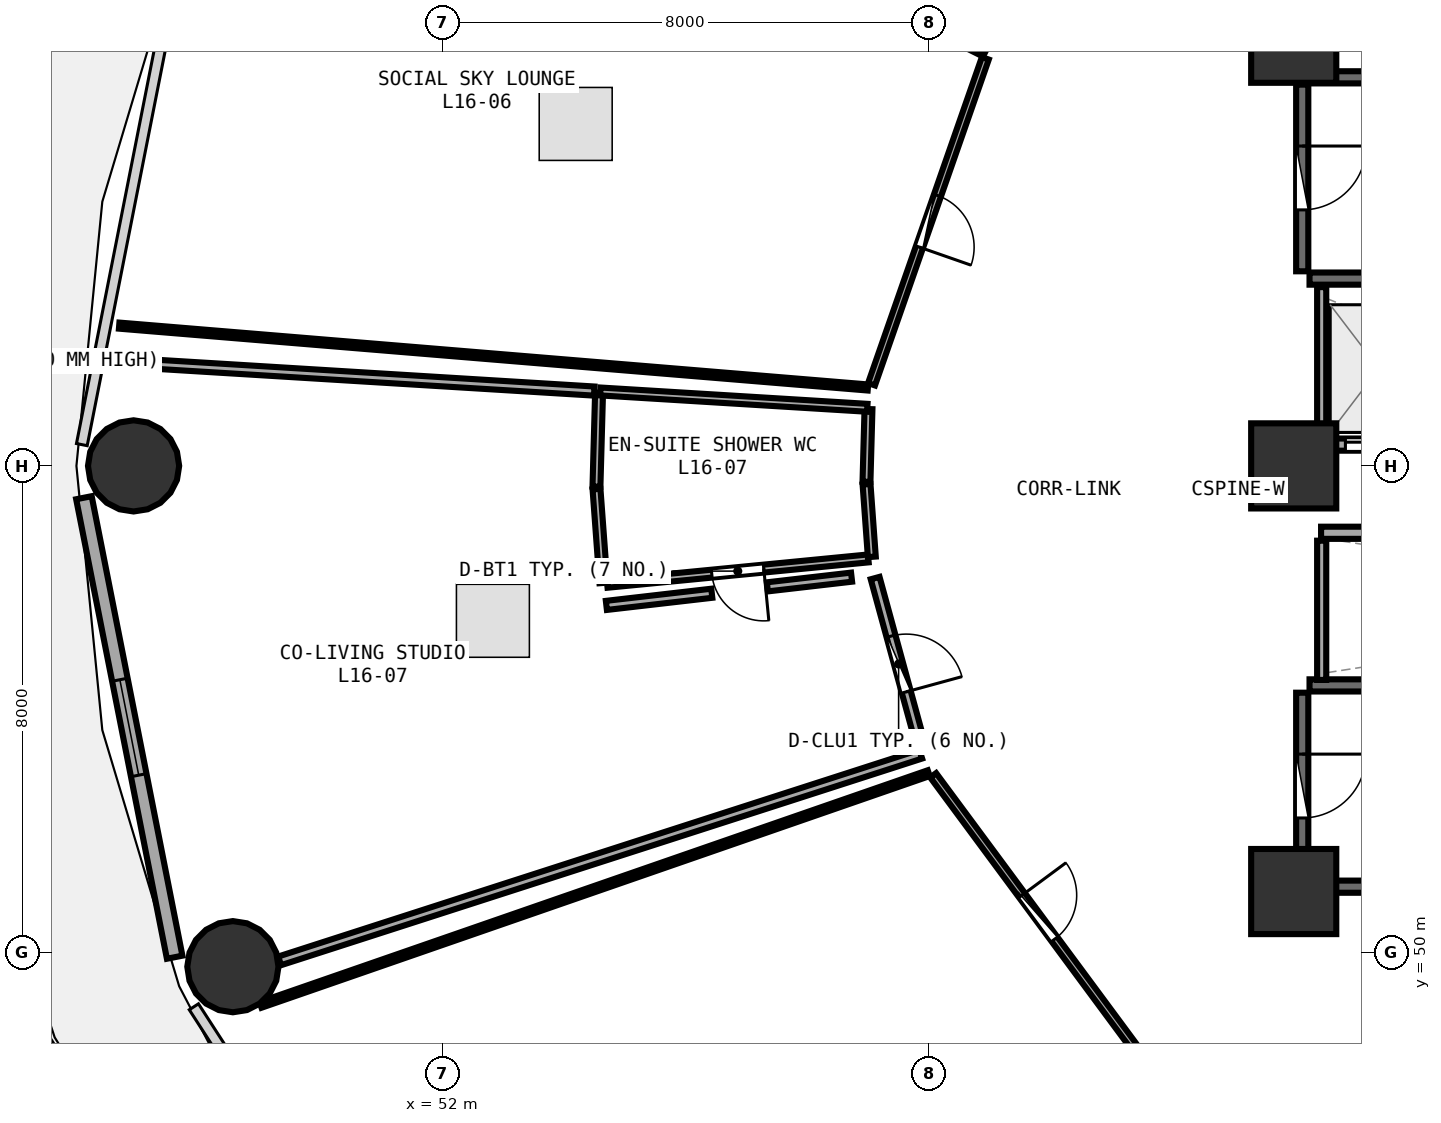
"""IFC4 building model, lengths in metres.
Left out: names, types, materials, properties, quantities, classifications, styles, units other than length and angle.
Written with IfcOpenShell. Run it as: python <this file> out.ifc"""

import sys

from ifc_helpers import new_model, si_unit, direction, frame, frame_2d, origin, origin_2d, place, context, subcontext, project, spatial, rectangle, circle, extrude, element, fill, save


model = new_model("IFC4")
c1 = context("Model", 3, precision=1e-05, world=origin(), true_north=direction((0.0, 1.0)))
c2 = subcontext(c1, "Body", "Model", "MODEL_VIEW")
j1 = project(units=[si_unit("LENGTHUNIT", "METRE"), si_unit("PLANEANGLEUNIT", "RADIAN")], contexts=[c1])
p1 = place(None, origin())
s1 = spatial("IfcSite", under=j1, at=p1, CompositionType="ELEMENT")
p2 = place(p1, origin())
s2 = spatial("IfcBuilding", under=s1, at=p2, CompositionType="ELEMENT")
p3 = place(p2, frame((0.0, 0.0, 63.75)))
s3 = spatial("IfcBuildingStorey", under=s2, at=p3, CompositionType="ELEMENT", Elevation=63.75)
for number, where, z_axis, x_axis in (
    (1, (66.0, 51.0, 0.0), (0.0, 0.0, 1.0), (1.0, 0.0, 0.0)),
    (2, (66.0, 65.0, 0.0), (0.0, 0.0, 1.0), (1.0, 0.0, 0.0)),
    (3, (66.0, 58.0, 0.0), (0.0, 0.0, 1.0), (1.0, 0.0, 0.0)),
):
    element("IfcColumn", number, at=place(p3, frame(where, z_axis=z_axis, x_axis=x_axis)), inside=s3, PredefinedType="PILASTER", context=c2, shape_type="SweptSolid", body=[
        extrude(rectangle(XDim=1.4, YDim=1.4, at=origin_2d()), origin(), (0.0, 0.0, 1.0), 3.75),
    ])
for number, where, z_axis, x_axis in (
    (4, (46.92, 58.0, 0.0), (0.0, 0.0, 1.0), (1.0, 0.0, 0.0)),
    (5, (48.553, 49.764, 0.0), (0.0, 0.0, 1.0), (1.0, 0.0, 0.0)),
):
    element("IfcColumn", number, at=place(p3, frame(where, z_axis=z_axis, x_axis=x_axis)), inside=s3, PredefinedType="COLUMN", context=c2, shape_type="SweptSolid", body=[
        extrude(circle(Radius=0.75, at=origin_2d()), origin(), (0.0, 0.0, 1.0), 3.75),
    ])
p4 = place(p3, frame((46.104, 57.477, 0.0), z_axis=(0.0, 0.0, 1.0), x_axis=(0.193726159581, -0.98105564322, 0.0)))
e6 = element("IfcWall", 6, at=p4, inside=s3, PredefinedType="SOLIDWALL", context=c2, shape_type="SweptSolid", body=[
    extrude(rectangle(XDim=7.703, YDim=0.26, at=frame_2d((3.851, 0.0))), origin(), (0.0, 0.0, 1.0), 3.475),
])
p5 = place(p4, frame((3.051, 0.0, 0.85)))
e7 = element("IfcOpeningElement", 7, at=p5, cuts=e6, PredefinedType="OPENING", context=c2, shape_type="SweptSolid", body=[
    extrude(rectangle(XDim=1.6, YDim=1.45, at=frame_2d((0.8, 0.725))), frame((0.0, 0.14, 0.0), z_axis=(0.0, -1.0, 0.0), x_axis=(1.0, 0.0, 0.0)), (0.0, 0.0, 1.0), 0.28),
])
for number, where, z_axis, x_axis in (
    (8, (66.26, 61.08, 0.0), (0.0, 0.0, 1.0), (1.0, 0.0, 0.0)),
    (9, (73.42, 64.39, 0.0), (0.0, 0.0, 1.0), (-1.0, 0.0, 0.0)),
):
    element("IfcWall", number, at=place(p3, frame(where, z_axis=z_axis, x_axis=x_axis)), inside=s3, PredefinedType="SHEAR", context=c2, shape_type="SweptSolid", body=[
        extrude(rectangle(XDim=7.16, YDim=0.2, at=frame_2d((3.58, 0.0))), origin(), (0.0, 0.0, 1.0), 3.49),
    ])
p6 = place(p3, frame((66.14, 64.27, 0.0), z_axis=(0.0, 0.0, 1.0), x_axis=(0.0, -1.0, 0.0)))
e10 = element("IfcWall", 10, at=p6, inside=s3, PredefinedType="SHEAR", context=c2, shape_type="SweptSolid", body=[
    extrude(rectangle(XDim=3.07, YDim=0.2, at=frame_2d((1.535, 0.0))), origin(), (0.0, 0.0, 1.0), 3.49),
])
p7 = place(p6, frame((1.01, 0.0, 0.0)))
e11 = element("IfcOpeningElement", 11, at=p7, cuts=e10, PredefinedType="OPENING", context=c2, shape_type="SweptSolid", body=[
    extrude(rectangle(XDim=1.05, YDim=2.1, at=frame_2d((0.525, 1.05))), frame((0.0, 0.11, 0.0), z_axis=(0.0, -1.0, 0.0), x_axis=(1.0, 0.0, 0.0)), (0.0, 0.0, 1.0), 0.22),
])
for number, where, z_axis, x_axis in (
    (12, (66.26, 51.08, 0.0), (0.0, 0.0, 1.0), (1.0, 0.0, 0.0)),
    (13, (73.42, 54.39, 0.0), (0.0, 0.0, 1.0), (-1.0, 0.0, 0.0)),
):
    element("IfcWall", number, at=place(p3, frame(where, z_axis=z_axis, x_axis=x_axis)), inside=s3, PredefinedType="SHEAR", context=c2, shape_type="SweptSolid", body=[
        extrude(rectangle(XDim=7.16, YDim=0.2, at=frame_2d((3.58, 0.0))), origin(), (0.0, 0.0, 1.0), 3.49),
    ])
p8 = place(p3, frame((66.14, 54.27, 0.0), z_axis=(0.0, 0.0, 1.0), x_axis=(0.0, -1.0, 0.0)))
e14 = element("IfcWall", 14, at=p8, inside=s3, PredefinedType="SHEAR", context=c2, shape_type="SweptSolid", body=[
    extrude(rectangle(XDim=3.07, YDim=0.2, at=frame_2d((1.535, 0.0))), origin(), (0.0, 0.0, 1.0), 3.49),
])
p9 = place(p8, frame((1.01, 0.0, 0.0)))
e15 = element("IfcOpeningElement", 15, at=p9, cuts=e14, PredefinedType="OPENING", context=c2, shape_type="SweptSolid", body=[
    extrude(rectangle(XDim=1.05, YDim=2.1, at=frame_2d((0.525, 1.05))), frame((0.0, 0.11, 0.0), z_axis=(0.0, -1.0, 0.0), x_axis=(1.0, 0.0, 0.0)), (0.0, 0.0, 1.0), 0.22),
])
p10 = place(p3, frame((66.45, 58.35, 0.0), z_axis=(0.0, 0.0, 1.0), x_axis=(1.0, 0.0, 0.0)))
e16 = element("IfcWall", 16, at=p10, inside=s3, PredefinedType="SOLIDWALL", context=c2, shape_type="SweptSolid", body=[
    extrude(rectangle(XDim=6.0, YDim=0.2, at=frame_2d((3.0, 0.0))), origin(), (0.0, 0.0, 1.0), 3.48),
])
p11 = place(p10, frame((0.4, 0.0, 0.0)))
e17 = element("IfcOpeningElement", 17, at=p11, cuts=e16, PredefinedType="OPENING", context=c2, shape_type="SweptSolid", body=[
    extrude(rectangle(XDim=1.1, YDim=2.1, at=frame_2d((0.55, 1.05))), frame((0.0, 0.11, 0.0), z_axis=(0.0, -1.0, 0.0), x_axis=(1.0, 0.0, 0.0)), (0.0, 0.0, 1.0), 0.22),
])
p12 = place(p10, frame((2.4, 0.0, 0.0)))
e18 = element("IfcOpeningElement", 18, at=p12, cuts=e16, PredefinedType="OPENING", context=c2, shape_type="SweptSolid", body=[
    extrude(rectangle(XDim=1.1, YDim=2.1, at=frame_2d((0.55, 1.05))), frame((0.0, 0.11, 0.0), z_axis=(0.0, -1.0, 0.0), x_axis=(1.0, 0.0, 0.0)), (0.0, 0.0, 1.0), 0.22),
])
p13 = place(p10, frame((4.4, 0.0, 0.0)))
e19 = element("IfcOpeningElement", 19, at=p13, cuts=e16, PredefinedType="OPENING", context=c2, shape_type="SweptSolid", body=[
    extrude(rectangle(XDim=1.1, YDim=2.1, at=frame_2d((0.55, 1.05))), frame((0.0, 0.11, 0.0), z_axis=(0.0, -1.0, 0.0), x_axis=(1.0, 0.0, 0.0)), (0.0, 0.0, 1.0), 0.22),
])
p14 = place(p3, frame((66.46, 58.48, 0.0), z_axis=(0.0, 0.0, 1.0), x_axis=(0.0, 1.0, 0.0)))
e20 = element("IfcWall", 20, at=p14, inside=s3, PredefinedType="PARTITIONING", context=c2, shape_type="SweptSolid", body=[
    extrude(rectangle(XDim=2.46, YDim=0.15, at=frame_2d((1.23, 0.0))), origin(), (0.0, 0.0, 1.0), 3.48),
])
p15 = place(p3, frame((66.45, 56.9, 0.0), z_axis=(0.0, 0.0, 1.0), x_axis=(1.0, 0.0, 0.0)))
e21 = element("IfcWall", 21, at=p15, inside=s3, PredefinedType="SOLIDWALL", context=c2, shape_type="SweptSolid", body=[
    extrude(rectangle(XDim=14.4, YDim=0.2, at=frame_2d((7.2, 0.0))), origin(), (0.0, 0.0, 1.0), 3.48),
])
p16 = place(p3, frame((66.46, 54.48, 0.0), z_axis=(0.0, 0.0, 1.0), x_axis=(0.0, 1.0, 0.0)))
e22 = element("IfcWall", 22, at=p16, inside=s3, PredefinedType="PARTITIONING", context=c2, shape_type="SweptSolid", body=[
    extrude(rectangle(XDim=2.29, YDim=0.15, at=frame_2d((1.145, 0.0))), origin(), (0.0, 0.0, 1.0), 3.48),
])
p17 = place(p3, frame((60.928, 64.702, 0.0), z_axis=(0.0, 0.0, 1.0), x_axis=(-0.329626249966, -0.944111505773, 0.0)))
e23 = element("IfcWall", 23, at=p17, inside=s3, PredefinedType="PARTITIONING", context=c2, shape_type="SweptSolid", body=[
    extrude(rectangle(XDim=5.677, YDim=0.12, at=frame_2d((2.839, 0.0))), origin(), (0.0, 0.0, 1.0), 3.48),
])
p18 = place(p17, frame((2.389, 0.0, 0.0)))
e24 = element("IfcOpeningElement", 24, at=p18, cuts=e23, PredefinedType="OPENING", context=c2, shape_type="SweptSolid", body=[
    extrude(rectangle(XDim=0.9, YDim=2.08, at=frame_2d((0.45, 1.04))), frame((0.0, 0.07, 0.0), z_axis=(0.0, -1.0, 0.0), x_axis=(1.0, 0.0, 0.0)), (0.0, 0.0, 1.0), 0.14),
])
p19 = place(p3, frame((59.003, 56.478, 0.0), z_axis=(0.0, 0.0, 1.0), x_axis=(-0.995308448338, -0.096752739847, 0.0)))
e25 = element("IfcWall", 25, at=p19, inside=s3, PredefinedType="PLUMBINGWALL", context=c2, shape_type="SweptSolid", body=[
    extrude(rectangle(XDim=4.315, YDim=0.13, at=frame_2d((2.157, 0.0))), origin(), (0.0, 0.0, 1.0), 3.175),
])
p20 = place(p19, frame((1.727, 0.0, 0.0)))
e26 = element("IfcOpeningElement", 26, at=p20, cuts=e25, PredefinedType="OPENING", context=c2, shape_type="SweptSolid", body=[
    extrude(rectangle(XDim=0.86, YDim=2.05, at=frame_2d((0.43, 1.025))), frame((0.0, 0.075, 0.0), z_axis=(0.0, -1.0, 0.0), x_axis=(1.0, 0.0, 0.0)), (0.0, 0.0, 1.0), 0.15),
])
p21 = place(p3, frame((59.116, 56.155, 0.0), z_axis=(0.0, 0.0, 1.0), x_axis=(0.263653235341, -0.964617526014, 0.0)))
e27 = element("IfcWall", 27, at=p21, inside=s3, PredefinedType="PARTITIONING", context=c2, shape_type="SweptSolid", body=[
    extrude(rectangle(XDim=2.93, YDim=0.15, at=frame_2d((1.465, 0.0))), origin(), (0.0, 0.0, 1.0), 3.48),
])
p22 = place(p21, frame((0.99, 0.0, 0.0)))
e28 = element("IfcOpeningElement", 28, at=p22, cuts=e27, PredefinedType="OPENING", context=c2, shape_type="SweptSolid", body=[
    extrude(rectangle(XDim=0.95, YDim=2.08, at=frame_2d((0.475, 1.04))), frame((0.0, 0.085, 0.0), z_axis=(0.0, -1.0, 0.0), x_axis=(1.0, 0.0, 0.0)), (0.0, 0.0, 1.0), 0.17),
])
p23 = place(p3, frame((60.071, 52.912, 0.0), z_axis=(0.0, 0.0, 1.0), x_axis=(0.594763174801, -0.80390096772, 0.0)))
e29 = element("IfcWall", 29, at=p23, inside=s3, PredefinedType="PARTITIONING", context=c2, shape_type="SweptSolid", body=[
    extrude(rectangle(XDim=5.81, YDim=0.12, at=frame_2d((2.905, 0.0))), origin(), (0.0, 0.0, 1.0), 2.875),
])
p24 = place(p23, frame((2.455, 0.0, 0.0)))
e30 = element("IfcOpeningElement", 30, at=p24, cuts=e29, PredefinedType="OPENING", context=c2, shape_type="SweptSolid", body=[
    extrude(rectangle(XDim=0.9, YDim=2.08, at=frame_2d((0.45, 1.04))), frame((0.0, 0.07, 0.0), z_axis=(0.0, -1.0, 0.0), x_axis=(1.0, 0.0, 0.0)), (0.0, 0.0, 1.0), 0.14),
])
p25 = place(p3, frame((58.997, 59.289, 0.0), z_axis=(0.0, 0.0, 1.0), x_axis=(-0.996604780232, 0.08233414856, 0.0)))
e31 = element("IfcWall", 31, at=p25, inside=s3, PredefinedType="PARTITIONING", context=c2, shape_type="SweptSolid", body=[
    extrude(rectangle(XDim=12.356, YDim=0.1, at=frame_2d((6.178, 0.0))), origin(), (0.0, 0.0, 1.0), 2.875),
])
p26 = place(p3, frame((50.173, 70.121, 0.0), z_axis=(0.0, 0.0, 1.0), x_axis=(0.895272258208, -0.445519453764, 0.0)))
e32 = element("IfcWall", 32, at=p26, inside=s3, PredefinedType="PARTITIONING", context=c2, shape_type="SweptSolid", body=[
    extrude(rectangle(XDim=11.996, YDim=0.1, at=frame_2d((5.998, 0.0))), origin(), (0.0, 0.0, 1.0), 2.875),
])
p27 = place(p3, frame((59.007, 58.934, 0.0), z_axis=(0.0, 0.0, 1.0), x_axis=(-0.027750076623, -0.99961489247, 0.0)))
e33 = element("IfcWall", 33, at=p27, inside=s3, PredefinedType="PLUMBINGWALL", context=c2, shape_type="SweptSolid", body=[
    extrude(rectangle(XDim=1.197, YDim=0.13, at=frame_2d((0.598, 0.0))), origin(), (0.0, 0.0, 1.0), 2.875),
])
p28 = place(p3, frame((58.975, 57.698, 0.0), z_axis=(0.0, 0.0, 1.0), x_axis=(0.072594705052, -0.99736152362, 0.0)))
e34 = element("IfcWall", 34, at=p28, inside=s3, PredefinedType="PLUMBINGWALL", context=c2, shape_type="SweptSolid", body=[
    extrude(rectangle(XDim=1.197, YDim=0.13, at=frame_2d((0.599, 0.0))), origin(), (0.0, 0.0, 1.0), 3.48),
])
p29 = place(p3, frame((54.647, 56.075, 0.0), z_axis=(0.0, 0.0, 1.0), x_axis=(-0.07367990301, 0.997281942027, 0.0)))
e35 = element("IfcWall", 35, at=p29, inside=s3, PredefinedType="PLUMBINGWALL", context=c2, shape_type="SweptSolid", body=[
    extrude(rectangle(XDim=1.547, YDim=0.13, at=frame_2d((0.774, 0.0))), origin(), (0.0, 0.0, 1.0), 3.175),
])
p30 = place(p3, frame((54.533, 57.658, 0.0), z_axis=(0.0, 0.0, 1.0), x_axis=(0.02760506688, 0.999618907526, 0.0)))
e36 = element("IfcWall", 36, at=p30, inside=s3, PredefinedType="PLUMBINGWALL", context=c2, shape_type="SweptSolid", body=[
    extrude(rectangle(XDim=1.548, YDim=0.13, at=frame_2d((0.774, 0.0))), origin(), (0.0, 0.0, 1.0), 2.875),
])
p31 = place(p3, frame((54.596, 59.224, 0.0), z_axis=(0.0, 0.0, 1.0), x_axis=(0.998131655241, -0.061099908397, 0.0)))
e37 = element("IfcWall", 37, at=p31, inside=s3, PredefinedType="PLUMBINGWALL", context=c2, shape_type="SweptSolid", body=[
    extrude(rectangle(XDim=4.399, YDim=0.13, at=frame_2d((2.2, 0.0))), origin(), (0.0, 0.0, 1.0), 3.175),
])
p32 = place(p3, frame((59.866, 53.259, 0.0), z_axis=(0.0, 0.0, 1.0), x_axis=(-0.951774856366, -0.30679736438, 0.0)))
e38 = element("IfcWall", 38, at=p32, inside=s3, PredefinedType="PARTITIONING", context=c2, shape_type="SweptSolid", body=[
    extrude(rectangle(XDim=11.078, YDim=0.15, at=frame_2d((5.539, 0.0))), origin(), (0.0, 0.0, 1.0), 2.875),
])
p33 = place(p3, frame((46.627, 59.712, 0.0), z_axis=(0.0, 0.0, 1.0), x_axis=(0.998135541011, -0.0610363971, 0.0)))
e39 = element("IfcWall", 39, at=p33, inside=s3, PredefinedType="PARTITIONING", context=c2, shape_type="SweptSolid", body=[
    extrude(rectangle(XDim=7.884, YDim=0.15, at=frame_2d((3.942, 0.0))), origin(), (0.0, 0.0, 1.0), 2.875),
])
p34 = place(p3, frame((54.696, 55.706, 0.0), z_axis=(0.0, 0.0, 1.0), x_axis=(0.993432194787, 0.114422350794, 0.0)))
e40 = element("IfcWall", 40, at=p34, inside=s3, PredefinedType="PARTITIONING", context=c2, shape_type="SweptSolid", body=[
    extrude(rectangle(XDim=1.745, YDim=0.15, at=frame_2d((0.873, 0.0))), origin(), (0.0, 0.0, 1.0), 3.175),
])
p35 = place(p3, frame((57.344, 56.011, 0.0), z_axis=(0.0, 0.0, 1.0), x_axis=(0.99343576075, 0.114391386311, 0.0)))
e41 = element("IfcWall", 41, at=p35, inside=s3, PredefinedType="PARTITIONING", context=c2, shape_type="SweptSolid", body=[
    extrude(rectangle(XDim=1.394, YDim=0.15, at=frame_2d((0.697, 0.0))), origin(), (0.0, 0.0, 1.0), 3.48),
])
p36 = place(p3, frame((49.008, 49.136, 0.0), z_axis=(0.0, 0.0, 1.0), x_axis=(0.944815756918, 0.327602175634, 0.0)))
e42 = element("IfcWall", 42, at=p36, inside=s3, PredefinedType="PARTITIONING", context=c2, shape_type="SweptSolid", body=[
    extrude(rectangle(XDim=11.632, YDim=0.1, at=frame_2d((5.816, 0.0))), origin(), (0.0, 0.0, 1.0), 2.875),
])
p37 = place(p5, origin())
e43 = element("IfcWindow", 43, at=p37, inside=s3, PartitioningType="SINGLE_PANEL", PredefinedType="WINDOW", context=c2, shape_type="SweptSolid", body=[
    extrude(rectangle(XDim=1.6, YDim=1.45, at=frame_2d((0.8, 0.725))), frame((0.0, 0.03, 0.0), z_axis=(0.0, -1.0, 0.0), x_axis=(1.0, 0.0, 0.0)), (0.0, 0.0, 1.0), 0.06),
])
fill(e7, e43)
p38 = place(p7, origin())
e44 = element("IfcDoor", 44, at=p38, inside=s3, OperationType="SINGLE_SWING_LEFT", PredefinedType="DOOR", context=c2, shape_type="SweptSolid", body=[
    extrude(rectangle(XDim=1.05, YDim=2.1, at=frame_2d((0.525, 1.05))), frame((0.0, 0.025, 0.0), z_axis=(0.0, -1.0, 0.0), x_axis=(1.0, 0.0, 0.0)), (0.0, 0.0, 1.0), 0.05),
])
fill(e11, e44)
p39 = place(p9, origin())
e45 = element("IfcDoor", 45, at=p39, inside=s3, OperationType="SINGLE_SWING_LEFT", PredefinedType="DOOR", context=c2, shape_type="SweptSolid", body=[
    extrude(rectangle(XDim=1.05, YDim=2.1, at=frame_2d((0.525, 1.05))), frame((0.0, 0.025, 0.0), z_axis=(0.0, -1.0, 0.0), x_axis=(1.0, 0.0, 0.0)), (0.0, 0.0, 1.0), 0.05),
])
fill(e15, e45)
p40 = place(p11, origin())
e46 = element("IfcDoor", 46, at=p40, inside=s3, OperationType="DOUBLE_DOOR_SLIDING", PredefinedType="DOOR", context=c2, shape_type="SweptSolid", body=[
    extrude(rectangle(XDim=1.1, YDim=2.1, at=frame_2d((0.55, 1.05))), frame((0.0, 0.025, 0.0), z_axis=(0.0, -1.0, 0.0), x_axis=(1.0, 0.0, 0.0)), (0.0, 0.0, 1.0), 0.05),
])
fill(e17, e46)
p41 = place(p18, origin())
e47 = element("IfcDoor", 47, at=p41, inside=s3, OperationType="SINGLE_SWING_RIGHT", PredefinedType="DOOR", context=c2, shape_type="SweptSolid", body=[
    extrude(rectangle(XDim=0.9, YDim=2.08, at=frame_2d((0.45, 1.04))), frame((0.0, 0.025, 0.0), z_axis=(0.0, -1.0, 0.0), x_axis=(1.0, 0.0, 0.0)), (0.0, 0.0, 1.0), 0.05),
])
fill(e24, e47)
p42 = place(p20, origin())
e48 = element("IfcDoor", 48, at=p42, inside=s3, OperationType="SINGLE_SWING_LEFT", PredefinedType="DOOR", context=c2, shape_type="SweptSolid", body=[
    extrude(rectangle(XDim=0.86, YDim=2.05, at=frame_2d((0.43, 1.025))), frame((0.0, 0.025, 0.0), z_axis=(0.0, -1.0, 0.0), x_axis=(1.0, 0.0, 0.0)), (0.0, 0.0, 1.0), 0.05),
])
fill(e26, e48)
p43 = place(p22, origin())
e49 = element("IfcDoor", 49, at=p43, inside=s3, OperationType="SINGLE_SWING_RIGHT", PredefinedType="DOOR", context=c2, shape_type="SweptSolid", body=[
    extrude(rectangle(XDim=0.95, YDim=2.08, at=frame_2d((0.475, 1.04))), frame((0.0, 0.025, 0.0), z_axis=(0.0, -1.0, 0.0), x_axis=(1.0, 0.0, 0.0)), (0.0, 0.0, 1.0), 0.05),
])
fill(e28, e49)
p44 = place(p24, origin())
e50 = element("IfcDoor", 50, at=p44, inside=s3, OperationType="SINGLE_SWING_LEFT", PredefinedType="DOOR", context=c2, shape_type="SweptSolid", body=[
    extrude(rectangle(XDim=0.9, YDim=2.08, at=frame_2d((0.45, 1.04))), frame((0.0, 0.025, 0.0), z_axis=(0.0, -1.0, 0.0), x_axis=(1.0, 0.0, 0.0)), (0.0, 0.0, 1.0), 0.05),
])
fill(e30, e50)
save(model, sys.argv[1])
